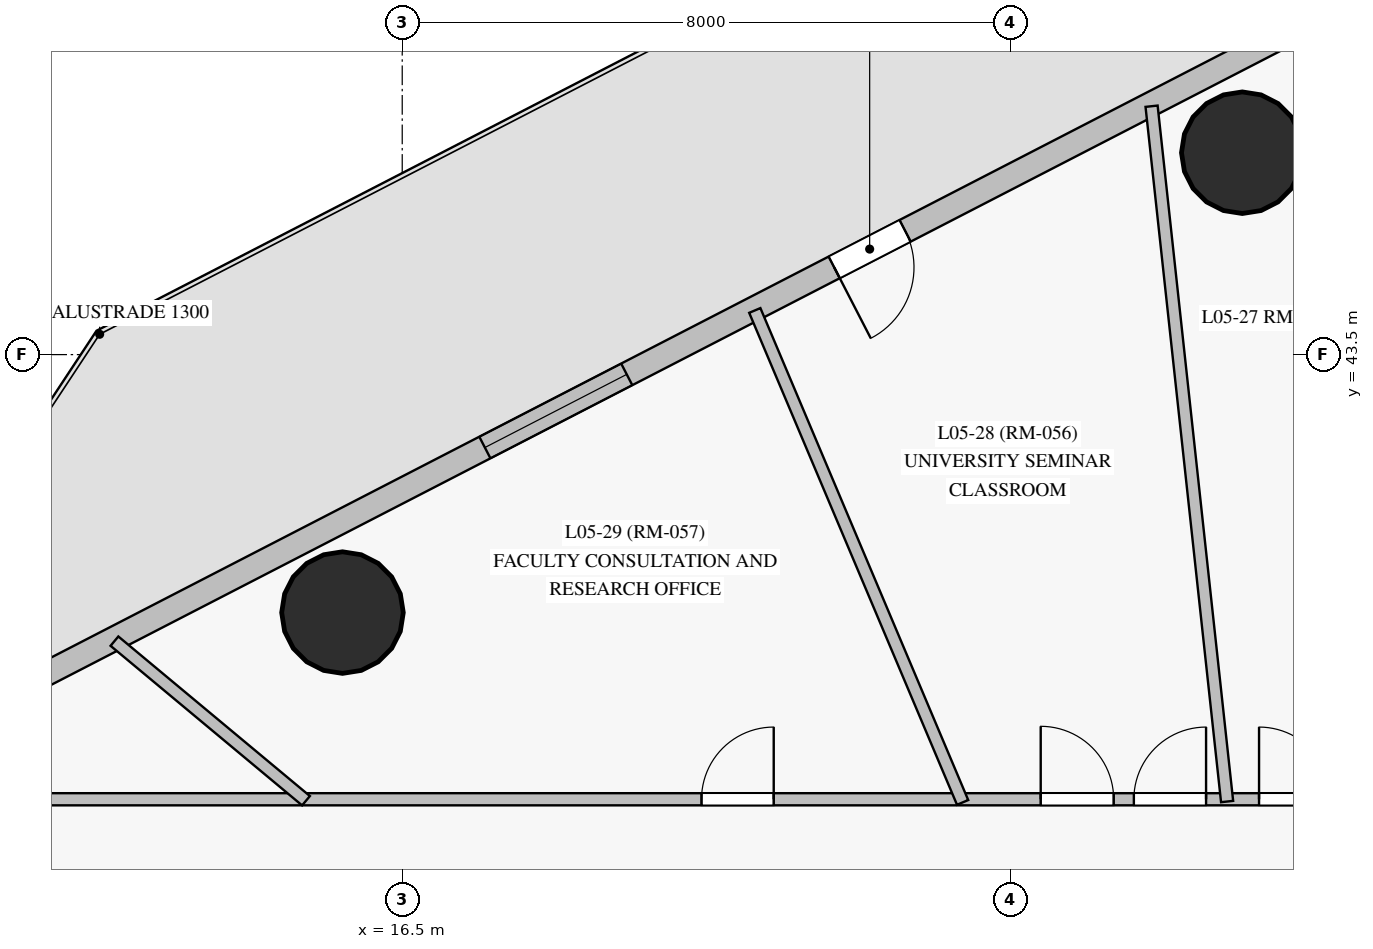
"""IFC4 building model, lengths in metres.
Left out: names, types, materials, properties, quantities, classifications, styles, units other than length and angle.
Written with IfcOpenShell. Run it as: python <this file> out.ifc"""

import sys

from ifc_helpers import new_model, si_unit, direction, frame, frame_2d, origin, origin_with_axes, origin_2d, place, context, subcontext, project, spatial, rectangle, circle, extrude, source, transform, mapped, element, fill, save


model = new_model("IFC4")
c1 = context("Model", 3, precision=1e-05, world=origin(), true_north=direction((0.0, 1.0)))
c2 = subcontext(c1, "Body", "Model", "MODEL_VIEW")
j1 = project(units=[si_unit("LENGTHUNIT", "METRE"), si_unit("PLANEANGLEUNIT", "RADIAN")], contexts=[c1])
p1 = place(None, origin())
s1 = spatial("IfcSite", under=j1, at=p1, CompositionType="ELEMENT")
p2 = place(p1, origin())
s2 = spatial("IfcBuilding", under=s1, at=p2, CompositionType="ELEMENT")
p3 = place(p2, frame((0.0, 0.0, 22.5)))
s3 = spatial("IfcBuildingStorey", under=s2, at=p3, CompositionType="ELEMENT", Elevation=22.5)
m1 = source(origin_with_axes(), c2, "Body", "SweptSolid", [
    extrude(circle(Radius=0.8, at=origin_2d()), origin(), (0.0, 0.0, 1.0), 4.0),
])
for number, where, z_axis, x_axis in (
    (1, (27.552, 46.156, 0.0), (0.0, 0.0, 1.0), (1.0, 0.0, 0.0)),
    (2, (15.714, 40.106, 0.0), (0.0, 0.0, 1.0), (1.0, 0.0, 0.0)),
):
    element("IfcColumn", number, at=place(p3, frame(where, z_axis=z_axis, x_axis=x_axis)), inside=s3, PredefinedType="COLUMN", context=c2, shape_type="MappedRepresentation", body=[
        mapped(m1, transform((0.0, 0.0, 0.0), scale=1.0)),
    ])
p4 = place(p3, frame((31.258, 49.327, 0.0), z_axis=(0.0, 0.0, 1.0), x_axis=(-0.888776453035, -0.458340939182, 0.0)))
e3 = element("IfcWall", 3, at=p4, inside=s3, PredefinedType="SOLIDWALL", context=c2, shape_type="SweptSolid", body=[
    extrude(rectangle(XDim=25.827, YDim=0.32, at=frame_2d((12.913, 0.0))), origin(), (0.0, 0.0, 1.0), 3.42),
])
p5 = place(p4, frame((13.281, 0.0, 0.85)))
e4 = element("IfcOpeningElement", 4, at=p5, cuts=e3, PredefinedType="OPENING", context=c2, shape_type="SweptSolid", body=[
    extrude(rectangle(XDim=2.1, YDim=1.95, at=frame_2d((1.05, 0.975))), frame((0.0, 0.17, 0.0), z_axis=(0.0, -1.0, 0.0), x_axis=(1.0, 0.0, 0.0)), (0.0, 0.0, 1.0), 0.34),
])
p6 = place(p4, frame((9.16, 0.0, 0.0)))
e5 = element("IfcOpeningElement", 5, at=p6, cuts=e3, PredefinedType="OPENING", context=c2, shape_type="SweptSolid", body=[
    extrude(rectangle(XDim=1.05, YDim=2.12, at=frame_2d((0.525, 1.06))), frame((0.0, 0.17, 0.0), z_axis=(0.0, -1.0, 0.0), x_axis=(1.0, 0.0, 0.0)), (0.0, 0.0, 1.0), 0.34),
])
p7 = place(p3, frame((10.5, 37.65, 0.0), z_axis=(0.0, 0.0, 1.0), x_axis=(1.0, 0.0, 0.0)))
e6 = element("IfcWall", 6, at=p7, inside=s3, PredefinedType="PARTITIONING", context=c2, shape_type="SweptSolid", body=[
    extrude(rectangle(XDim=29.75, YDim=0.16, at=frame_2d((14.875, 0.0))), origin(), (0.0, 0.0, 1.0), 3.15),
])
p8 = place(p7, frame((26.813, 0.0, 0.0)))
e7 = element("IfcOpeningElement", 7, at=p8, cuts=e6, PredefinedType="OPENING", context=c2, shape_type="SweptSolid", body=[
    extrude(rectangle(XDim=0.96, YDim=2.15, at=frame_2d((0.48, 1.075))), frame((0.0, 0.09, 0.0), z_axis=(0.0, -1.0, 0.0), x_axis=(1.0, 0.0, 0.0)), (0.0, 0.0, 1.0), 0.18),
])
p9 = place(p7, frame((24.312, 0.0, 0.0)))
e8 = element("IfcOpeningElement", 8, at=p9, cuts=e6, PredefinedType="OPENING", context=c2, shape_type="SweptSolid", body=[
    extrude(rectangle(XDim=0.95, YDim=2.15, at=frame_2d((0.475, 1.075))), frame((0.0, 0.09, 0.0), z_axis=(0.0, -1.0, 0.0), x_axis=(1.0, 0.0, 0.0)), (0.0, 0.0, 1.0), 0.18),
])
p10 = place(p7, frame((21.84, 0.0, 0.0)))
e9 = element("IfcOpeningElement", 9, at=p10, cuts=e6, PredefinedType="OPENING", context=c2, shape_type="SweptSolid", body=[
    extrude(rectangle(XDim=0.95, YDim=2.15, at=frame_2d((0.475, 1.075))), frame((0.0, 0.09, 0.0), z_axis=(0.0, -1.0, 0.0), x_axis=(1.0, 0.0, 0.0)), (0.0, 0.0, 1.0), 0.18),
])
p11 = place(p7, frame((19.498, 0.0, 0.0)))
e10 = element("IfcOpeningElement", 10, at=p11, cuts=e6, PredefinedType="OPENING", context=c2, shape_type="SweptSolid", body=[
    extrude(rectangle(XDim=0.96, YDim=2.15, at=frame_2d((0.48, 1.075))), frame((0.0, 0.09, 0.0), z_axis=(0.0, -1.0, 0.0), x_axis=(1.0, 0.0, 0.0)), (0.0, 0.0, 1.0), 0.18),
])
p12 = place(p7, frame((17.272, 0.0, 0.0)))
e11 = element("IfcOpeningElement", 11, at=p12, cuts=e6, PredefinedType="OPENING", context=c2, shape_type="SweptSolid", body=[
    extrude(rectangle(XDim=0.95, YDim=2.15, at=frame_2d((0.475, 1.075))), frame((0.0, 0.09, 0.0), z_axis=(0.0, -1.0, 0.0), x_axis=(1.0, 0.0, 0.0)), (0.0, 0.0, 1.0), 0.18),
])
p13 = place(p7, frame((15.625, 0.0, 0.0)))
e12 = element("IfcOpeningElement", 12, at=p13, cuts=e6, PredefinedType="OPENING", context=c2, shape_type="SweptSolid", body=[
    extrude(rectangle(XDim=0.95, YDim=2.15, at=frame_2d((0.475, 1.075))), frame((0.0, 0.09, 0.0), z_axis=(0.0, -1.0, 0.0), x_axis=(1.0, 0.0, 0.0)), (0.0, 0.0, 1.0), 0.18),
])
p14 = place(p7, frame((14.4, 0.0, 0.0)))
e13 = element("IfcOpeningElement", 13, at=p14, cuts=e6, PredefinedType="OPENING", context=c2, shape_type="SweptSolid", body=[
    extrude(rectangle(XDim=0.96, YDim=2.15, at=frame_2d((0.48, 1.075))), frame((0.0, 0.09, 0.0), z_axis=(0.0, -1.0, 0.0), x_axis=(1.0, 0.0, 0.0)), (0.0, 0.0, 1.0), 0.18),
])
p15 = place(p7, frame((9.938, 0.0, 0.0)))
e14 = element("IfcOpeningElement", 14, at=p15, cuts=e6, PredefinedType="OPENING", context=c2, shape_type="SweptSolid", body=[
    extrude(rectangle(XDim=0.95, YDim=2.15, at=frame_2d((0.475, 1.075))), frame((0.0, 0.09, 0.0), z_axis=(0.0, -1.0, 0.0), x_axis=(1.0, 0.0, 0.0)), (0.0, 0.0, 1.0), 0.18),
])
p16 = place(p3, frame((27.352, 37.62, 0.0), z_axis=(0.0, 0.0, 1.0), x_axis=(-0.107990771292, 0.994151896501, 0.0)))
e15 = element("IfcWall", 15, at=p16, inside=s3, PredefinedType="PARTITIONING", context=c2, shape_type="SweptSolid", body=[
    extrude(rectangle(XDim=9.201, YDim=0.16, at=frame_2d((4.601, 0.0))), origin(), (0.0, 0.0, 1.0), 3.1),
])
p17 = place(p3, frame((23.873, 37.609, 0.0), z_axis=(0.0, 0.0, 1.0), x_axis=(-0.389116211811, 0.921188674326, 0.0)))
e16 = element("IfcWall", 16, at=p17, inside=s3, PredefinedType="PARTITIONING", context=c2, shape_type="SweptSolid", body=[
    extrude(rectangle(XDim=7.026, YDim=0.16, at=frame_2d((3.513, 0.0))), origin(), (0.0, 0.0, 1.0), 3.75),
])
p18 = place(p3, frame((15.234, 37.631, 0.0), z_axis=(0.0, 0.0, 1.0), x_axis=(-0.768282285562, 0.640111185413, 0.0)))
e17 = element("IfcWall", 17, at=p18, inside=s3, PredefinedType="PARTITIONING", context=c2, shape_type="SweptSolid", body=[
    extrude(rectangle(XDim=3.28, YDim=0.16, at=frame_2d((1.64, 0.0))), origin(), (0.0, 0.0, 1.0), 3.75),
])
m2 = source(origin_with_axes(), c2, "Body", "SweptSolid", [
    extrude(rectangle(XDim=2.1, YDim=1.95, at=frame_2d((1.05, 0.975))), frame((0.0, 0.03, 0.0), z_axis=(0.0, -1.0, 0.0), x_axis=(1.0, 0.0, 0.0)), (0.0, 0.0, 1.0), 0.06),
])
p19 = place(p5, origin())
e18 = element("IfcWindow", 18, at=p19, inside=s3, PartitioningType="SINGLE_PANEL", PredefinedType="WINDOW", context=c2, shape_type="MappedRepresentation", body=[
    mapped(m2, transform((0.0, 0.0, 0.0), scale=1.0)),
])
fill(e4, e18)
m3 = source(origin_with_axes(), c2, "Body", "SweptSolid", [
    extrude(rectangle(XDim=1.05, YDim=2.12, at=frame_2d((0.525, 1.06))), frame((0.0, 0.025, 0.0), z_axis=(0.0, -1.0, 0.0), x_axis=(1.0, 0.0, 0.0)), (0.0, 0.0, 1.0), 0.05),
])
p20 = place(p6, origin())
e19 = element("IfcDoor", 19, at=p20, inside=s3, OperationType="SINGLE_SWING_RIGHT", PredefinedType="DOOR", context=c2, shape_type="MappedRepresentation", body=[
    mapped(m3, transform((0.0, 0.0, 0.0), scale=1.0)),
])
fill(e5, e19)
m4 = source(origin_with_axes(), c2, "Body", "SweptSolid", [
    extrude(rectangle(XDim=0.95, YDim=2.15, at=frame_2d((0.475, 1.075))), frame((0.0, 0.025, 0.0), z_axis=(0.0, -1.0, 0.0), x_axis=(1.0, 0.0, 0.0)), (0.0, 0.0, 1.0), 0.05),
])
p21 = place(p12, origin())
e20 = element("IfcDoor", 20, at=p21, inside=s3, OperationType="SINGLE_SWING_LEFT", PredefinedType="DOOR", context=c2, shape_type="MappedRepresentation", body=[
    mapped(m4, transform((0.0, 0.0, 0.0), scale=1.0)),
])
fill(e11, e20)
p22 = place(p13, origin())
e21 = element("IfcDoor", 21, at=p22, inside=s3, OperationType="SINGLE_SWING_RIGHT", PredefinedType="DOOR", context=c2, shape_type="MappedRepresentation", body=[
    mapped(m4, transform((0.0, 0.0, 0.0), scale=1.0)),
])
fill(e12, e21)
m5 = source(origin_with_axes(), c2, "Body", "SweptSolid", [
    extrude(rectangle(XDim=0.96, YDim=2.15, at=frame_2d((0.48, 1.075))), frame((0.0, 0.025, 0.0), z_axis=(0.0, -1.0, 0.0), x_axis=(1.0, 0.0, 0.0)), (0.0, 0.0, 1.0), 0.05),
])
p23 = place(p14, origin())
e22 = element("IfcDoor", 22, at=p23, inside=s3, OperationType="SINGLE_SWING_LEFT", PredefinedType="DOOR", context=c2, shape_type="MappedRepresentation", body=[
    mapped(m5, transform((0.0, 0.0, 0.0), scale=1.0)),
])
fill(e13, e22)
p24 = place(p15, origin())
e23 = element("IfcDoor", 23, at=p24, inside=s3, OperationType="SINGLE_SWING_RIGHT", PredefinedType="DOOR", context=c2, shape_type="MappedRepresentation", body=[
    mapped(m4, transform((0.0, 0.0, 0.0), scale=1.0)),
])
fill(e14, e23)
save(model, sys.argv[1])
